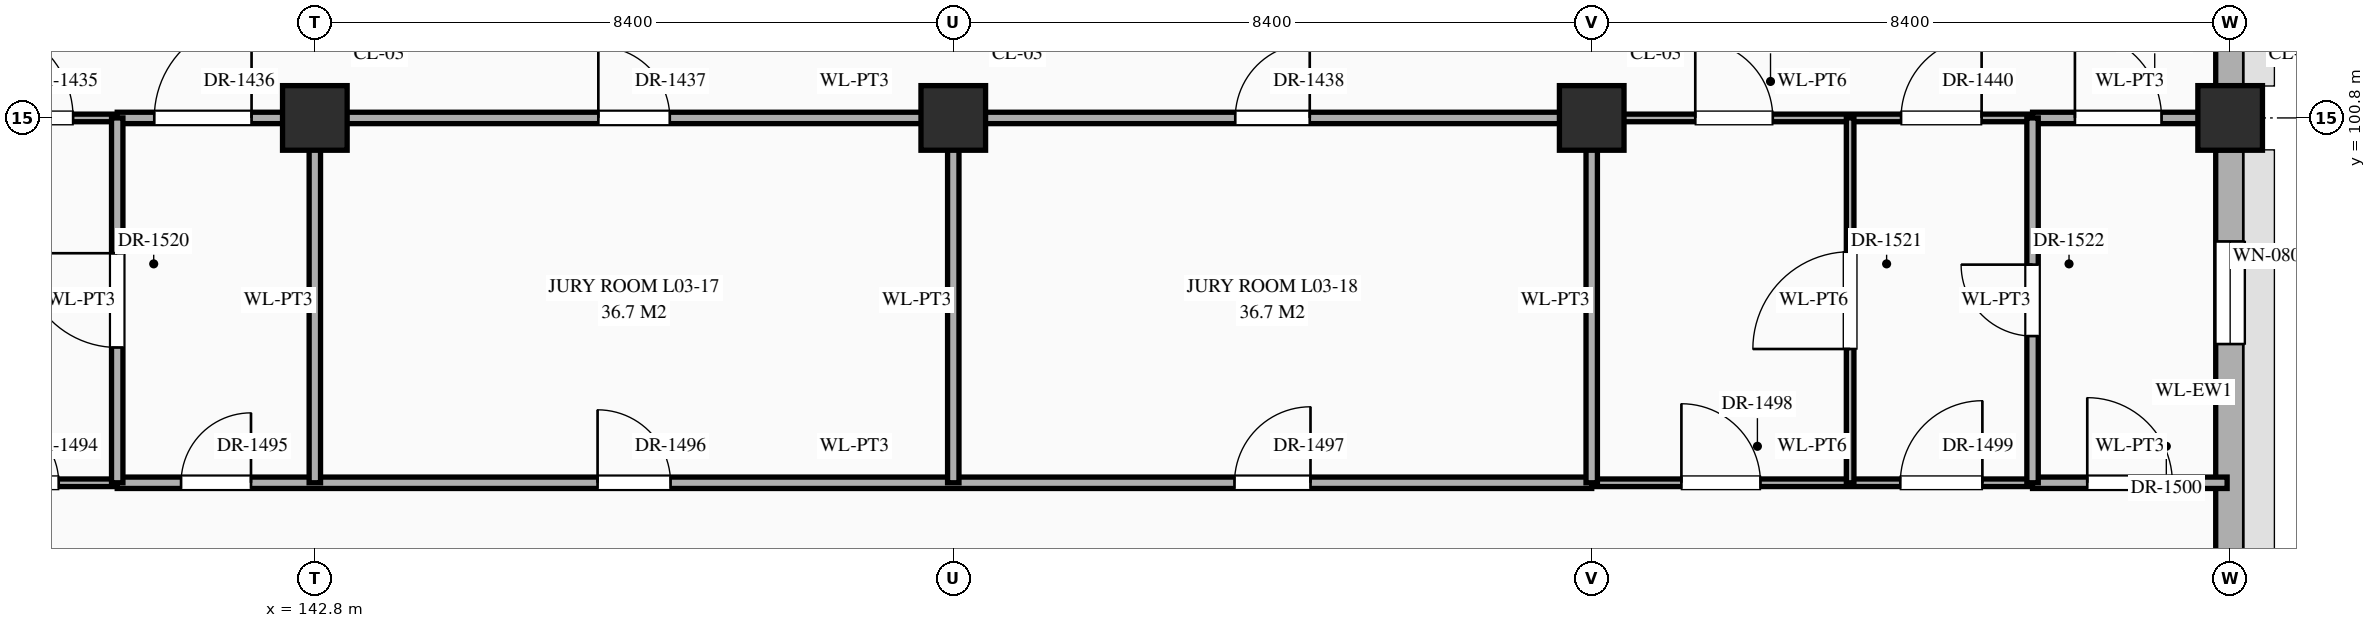
"""IFC4 building model, lengths in metres.
Left out: names, types, materials, properties, quantities, classifications, styles, units other than length and angle.
Written with IfcOpenShell. Run it as: python <this file> out.ifc"""

import sys

from ifc_helpers import new_model, si_unit, direction, frame, frame_2d, origin, origin_2d, place, context, subcontext, project, spatial, rectangle, extrude, element, fill, save


model = new_model("IFC4")
c1 = context("Model", 3, precision=1e-05, world=origin(), true_north=direction((0.0, 1.0)))
c2 = subcontext(c1, "Body", "Model", "MODEL_VIEW")
j1 = project(units=[si_unit("LENGTHUNIT", "METRE"), si_unit("PLANEANGLEUNIT", "RADIAN")], contexts=[c1])
p1 = place(None, origin())
s1 = spatial("IfcSite", under=j1, at=p1, CompositionType="ELEMENT")
p2 = place(p1, origin())
s2 = spatial("IfcBuilding", under=s1, at=p2, CompositionType="ELEMENT")
p3 = place(p2, frame((0.0, 0.0, 10.8)))
s3 = spatial("IfcBuildingStorey", under=s2, at=p3, CompositionType="ELEMENT", Elevation=10.8)
for number, where, z_axis, x_axis in (
    (1, (142.8, 100.8, 0.0), (0.0, 0.0, 1.0), (1.0, 0.0, 0.0)),
    (2, (151.2, 100.8, 0.0), (0.0, 0.0, 1.0), (1.0, 0.0, 0.0)),
    (3, (159.6, 100.8, 0.0), (0.0, 0.0, 1.0), (1.0, 0.0, 0.0)),
    (4, (168.0, 100.8, 0.0), (0.0, 0.0, 1.0), (1.0, 0.0, 0.0)),
):
    element("IfcColumn", number, at=place(p3, frame(where, z_axis=z_axis, x_axis=x_axis)), inside=s3, PredefinedType="COLUMN", context=c2, shape_type="SweptSolid", body=[
        extrude(rectangle(XDim=0.85, YDim=0.85, at=origin_2d()), origin(), (0.0, 0.0, 1.0), 5.4),
    ])
p4 = place(p3, frame((168.0, 94.02, 0.0), z_axis=(0.0, 0.0, 1.0), x_axis=(0.0, 1.0, 0.0)))
e5 = element("IfcWall", 5, at=p4, inside=s3, PredefinedType="STANDARD", context=c2, shape_type="SweptSolid", body=[
    extrude(rectangle(XDim=6.36, YDim=0.38, at=frame_2d((3.18, 0.0))), origin(), (0.0, 0.0, 1.0), 4.47),
])
p5 = place(p4, frame((3.805, 0.0, 0.85)))
e6 = element("IfcOpeningElement", 6, at=p5, cuts=e5, PredefinedType="OPENING", context=c2, shape_type="SweptSolid", body=[
    extrude(rectangle(XDim=1.35, YDim=1.2, at=frame_2d((0.675, 0.6))), frame((0.0, 0.202, 0.0), z_axis=(0.0, -1.0, 0.0), x_axis=(1.0, 0.0, 0.0)), (0.0, 0.0, 1.0), 0.404),
])
p6 = place(p3, frame((168.0, 101.22, 0.0), z_axis=(0.0, 0.0, 1.0), x_axis=(0.0, 1.0, 0.0)))
e7 = element("IfcWall", 7, at=p6, inside=s3, PredefinedType="STANDARD", context=c2, shape_type="SweptSolid", body=[
    extrude(rectangle(XDim=6.36, YDim=0.38, at=frame_2d((3.18, 0.0))), origin(), (0.0, 0.0, 1.0), 4.47),
])
p7 = place(p6, frame((3.805, 0.0, 0.85)))
e8 = element("IfcOpeningElement", 8, at=p7, cuts=e7, PredefinedType="OPENING", context=c2, shape_type="SweptSolid", body=[
    extrude(rectangle(XDim=1.35, YDim=1.38, at=frame_2d((0.675, 0.69))), frame((0.0, 0.202, 0.0), z_axis=(0.0, -1.0, 0.0), x_axis=(1.0, 0.0, 0.0)), (0.0, 0.0, 1.0), 0.404),
])
p8 = place(p3, frame((134.4, 96.0, 0.0), z_axis=(0.0, 0.0, 1.0), x_axis=(1.0, 0.0, 0.0)))
e9 = element("IfcWall", 9, at=p8, inside=s3, PredefinedType="STANDARD", context=c2, shape_type="SweptSolid", body=[
    extrude(rectangle(XDim=5.8, YDim=0.1, at=frame_2d((2.9, 0.0))), origin(), (0.0, 0.0, 1.0), 5.12),
])
p9 = place(p8, frame((1.25, 0.0, 0.0)))
e10 = element("IfcOpeningElement", 10, at=p9, cuts=e9, PredefinedType="OPENING", context=c2, shape_type="SweptSolid", body=[
    extrude(rectangle(XDim=0.9, YDim=2.15, at=frame_2d((0.45, 1.075))), frame((0.0, 0.062, 0.0), z_axis=(0.0, -1.0, 0.0), x_axis=(1.0, 0.0, 0.0)), (0.0, 0.0, 1.0), 0.124),
])
p10 = place(p8, frame((4.17, 0.0, 0.0)))
e11 = element("IfcOpeningElement", 11, at=p10, cuts=e9, PredefinedType="OPENING", context=c2, shape_type="SweptSolid", body=[
    extrude(rectangle(XDim=0.86, YDim=2.1, at=frame_2d((0.43, 1.05))), frame((0.0, 0.062, 0.0), z_axis=(0.0, -1.0, 0.0), x_axis=(1.0, 0.0, 0.0)), (0.0, 0.0, 1.0), 0.124),
])
p11 = place(p3, frame((140.2, 96.0, 0.0), z_axis=(0.0, 0.0, 1.0), x_axis=(1.0, 0.0, 0.0)))
e12 = element("IfcWall", 12, at=p11, inside=s3, PredefinedType="STANDARD", context=c2, shape_type="SweptSolid", body=[
    extrude(rectangle(XDim=19.4, YDim=0.15, at=frame_2d((9.7, 0.0))), origin(), (0.0, 0.0, 1.0), 5.12),
])
p12 = place(p11, frame((0.84, 0.0, 0.0)))
e13 = element("IfcOpeningElement", 13, at=p12, cuts=e12, PredefinedType="OPENING", context=c2, shape_type="SweptSolid", body=[
    extrude(rectangle(XDim=0.92, YDim=2.15, at=frame_2d((0.46, 1.075))), frame((0.0, 0.087, 0.0), z_axis=(0.0, -1.0, 0.0), x_axis=(1.0, 0.0, 0.0)), (0.0, 0.0, 1.0), 0.174),
])
p13 = place(p11, frame((6.32, 0.0, 0.0)))
e14 = element("IfcOpeningElement", 14, at=p13, cuts=e12, PredefinedType="OPENING", context=c2, shape_type="SweptSolid", body=[
    extrude(rectangle(XDim=0.96, YDim=2.2, at=frame_2d((0.48, 1.1))), frame((0.0, 0.087, 0.0), z_axis=(0.0, -1.0, 0.0), x_axis=(1.0, 0.0, 0.0)), (0.0, 0.0, 1.0), 0.174),
])
p14 = place(p11, frame((14.7, 0.0, 0.0)))
e15 = element("IfcOpeningElement", 15, at=p14, cuts=e12, PredefinedType="OPENING", context=c2, shape_type="SweptSolid", body=[
    extrude(rectangle(XDim=1.0, YDim=2.25, at=frame_2d((0.5, 1.125))), frame((0.0, 0.087, 0.0), z_axis=(0.0, -1.0, 0.0), x_axis=(1.0, 0.0, 0.0)), (0.0, 0.0, 1.0), 0.174),
])
p15 = place(p3, frame((159.6, 96.0, 0.0), z_axis=(0.0, 0.0, 1.0), x_axis=(1.0, 0.0, 0.0)))
e16 = element("IfcWall", 16, at=p15, inside=s3, PredefinedType="STANDARD", context=c2, shape_type="SweptSolid", body=[
    extrude(rectangle(XDim=5.8, YDim=0.1, at=frame_2d((2.9, 0.0))), origin(), (0.0, 0.0, 1.0), 5.12),
])
p16 = place(p15, frame((1.18, 0.0, 0.0)))
e17 = element("IfcOpeningElement", 17, at=p16, cuts=e16, PredefinedType="OPENING", context=c2, shape_type="SweptSolid", body=[
    extrude(rectangle(XDim=1.04, YDim=2.2, at=frame_2d((0.52, 1.1))), frame((0.0, 0.062, 0.0), z_axis=(0.0, -1.0, 0.0), x_axis=(1.0, 0.0, 0.0)), (0.0, 0.0, 1.0), 0.124),
])
p17 = place(p15, frame((4.06, 0.0, 0.0)))
e18 = element("IfcOpeningElement", 18, at=p17, cuts=e16, PredefinedType="OPENING", context=c2, shape_type="SweptSolid", body=[
    extrude(rectangle(XDim=1.08, YDim=2.25, at=frame_2d((0.54, 1.125))), frame((0.0, 0.062, 0.0), z_axis=(0.0, -1.0, 0.0), x_axis=(1.0, 0.0, 0.0)), (0.0, 0.0, 1.0), 0.124),
])
p18 = place(p3, frame((165.4, 96.0, 0.0), z_axis=(0.0, 0.0, 1.0), x_axis=(1.0, 0.0, 0.0)))
e19 = element("IfcWall", 19, at=p18, inside=s3, PredefinedType="STANDARD", context=c2, shape_type="SweptSolid", body=[
    extrude(rectangle(XDim=2.56, YDim=0.15, at=frame_2d((1.28, 0.0))), origin(), (0.0, 0.0, 1.0), 5.12),
])
p19 = place(p18, frame((0.72, 0.0, 0.0)))
e20 = element("IfcOpeningElement", 20, at=p19, cuts=e19, PredefinedType="OPENING", context=c2, shape_type="SweptSolid", body=[
    extrude(rectangle(XDim=1.12, YDim=2.25, at=frame_2d((0.56, 1.125))), frame((0.0, 0.087, 0.0), z_axis=(0.0, -1.0, 0.0), x_axis=(1.0, 0.0, 0.0)), (0.0, 0.0, 1.0), 0.174),
])
p20 = place(p3, frame((134.4, 100.8, 0.0), z_axis=(0.0, 0.0, 1.0), x_axis=(1.0, 0.0, 0.0)))
e21 = element("IfcWall", 21, at=p20, inside=s3, PredefinedType="STANDARD", context=c2, shape_type="SweptSolid", body=[
    extrude(rectangle(XDim=5.8, YDim=0.1, at=frame_2d((2.9, 0.0))), origin(), (0.0, 0.0, 1.0), 4.27),
])
p21 = place(p20, frame((1.272, 0.0, 0.0)))
e22 = element("IfcOpeningElement", 22, at=p21, cuts=e21, PredefinedType="OPENING", context=c2, shape_type="SweptSolid", body=[
    extrude(rectangle(XDim=1.2, YDim=2.35, at=frame_2d((0.6, 1.175))), frame((0.0, 0.062, 0.0), z_axis=(0.0, -1.0, 0.0), x_axis=(1.0, 0.0, 0.0)), (0.0, 0.0, 1.0), 0.124),
])
p22 = place(p20, frame((3.98, 0.0, 0.0)))
e23 = element("IfcOpeningElement", 23, at=p22, cuts=e21, PredefinedType="OPENING", context=c2, shape_type="SweptSolid", body=[
    extrude(rectangle(XDim=1.24, YDim=2.3, at=frame_2d((0.62, 1.15))), frame((0.0, 0.062, 0.0), z_axis=(0.0, -1.0, 0.0), x_axis=(1.0, 0.0, 0.0)), (0.0, 0.0, 1.0), 0.124),
])
p23 = place(p3, frame((140.2, 100.8, 0.0), z_axis=(0.0, 0.0, 1.0), x_axis=(1.0, 0.0, 0.0)))
e24 = element("IfcWall", 24, at=p23, inside=s3, PredefinedType="STANDARD", context=c2, shape_type="SweptSolid", body=[
    extrude(rectangle(XDim=19.4, YDim=0.15, at=frame_2d((9.7, 0.0))), origin(), (0.0, 0.0, 1.0), 4.27),
])
p24 = place(p23, frame((0.488, 0.0, 0.0)))
e25 = element("IfcOpeningElement", 25, at=p24, cuts=e24, PredefinedType="OPENING", context=c2, shape_type="SweptSolid", body=[
    extrude(rectangle(XDim=1.28, YDim=2.35, at=frame_2d((0.64, 1.175))), frame((0.0, 0.087, 0.0), z_axis=(0.0, -1.0, 0.0), x_axis=(1.0, 0.0, 0.0)), (0.0, 0.0, 1.0), 0.174),
])
p25 = place(p23, frame((6.33, 0.0, 0.0)))
e26 = element("IfcOpeningElement", 26, at=p25, cuts=e24, PredefinedType="OPENING", context=c2, shape_type="SweptSolid", body=[
    extrude(rectangle(XDim=0.94, YDim=2.3, at=frame_2d((0.47, 1.15))), frame((0.0, 0.087, 0.0), z_axis=(0.0, -1.0, 0.0), x_axis=(1.0, 0.0, 0.0)), (0.0, 0.0, 1.0), 0.174),
])
p26 = place(p23, frame((14.71, 0.0, 0.0)))
e27 = element("IfcOpeningElement", 27, at=p26, cuts=e24, PredefinedType="OPENING", context=c2, shape_type="SweptSolid", body=[
    extrude(rectangle(XDim=0.98, YDim=2.35, at=frame_2d((0.49, 1.175))), frame((0.0, 0.087, 0.0), z_axis=(0.0, -1.0, 0.0), x_axis=(1.0, 0.0, 0.0)), (0.0, 0.0, 1.0), 0.174),
])
p27 = place(p3, frame((159.6, 100.8, 0.0), z_axis=(0.0, 0.0, 1.0), x_axis=(1.0, 0.0, 0.0)))
e28 = element("IfcWall", 28, at=p27, inside=s3, PredefinedType="STANDARD", context=c2, shape_type="SweptSolid", body=[
    extrude(rectangle(XDim=5.8, YDim=0.1, at=frame_2d((2.9, 0.0))), origin(), (0.0, 0.0, 1.0), 4.27),
])
p28 = place(p27, frame((1.363, 0.0, 0.0)))
e29 = element("IfcOpeningElement", 29, at=p28, cuts=e28, PredefinedType="OPENING", context=c2, shape_type="SweptSolid", body=[
    extrude(rectangle(XDim=1.02, YDim=2.4, at=frame_2d((0.51, 1.2))), frame((0.0, 0.062, 0.0), z_axis=(0.0, -1.0, 0.0), x_axis=(1.0, 0.0, 0.0)), (0.0, 0.0, 1.0), 0.124),
])
p29 = place(p27, frame((4.07, 0.0, 0.0)))
e30 = element("IfcOpeningElement", 30, at=p29, cuts=e28, PredefinedType="OPENING", context=c2, shape_type="SweptSolid", body=[
    extrude(rectangle(XDim=1.06, YDim=2.4, at=frame_2d((0.53, 1.2))), frame((0.0, 0.062, 0.0), z_axis=(0.0, -1.0, 0.0), x_axis=(1.0, 0.0, 0.0)), (0.0, 0.0, 1.0), 0.124),
])
p30 = place(p3, frame((165.4, 100.8, 0.0), z_axis=(0.0, 0.0, 1.0), x_axis=(1.0, 0.0, 0.0)))
e31 = element("IfcWall", 31, at=p30, inside=s3, PredefinedType="STANDARD", context=c2, shape_type="SweptSolid", body=[
    extrude(rectangle(XDim=2.56, YDim=0.15, at=frame_2d((1.28, 0.0))), origin(), (0.0, 0.0, 1.0), 4.27),
])
p31 = place(p30, frame((0.558, 0.0, 0.0)))
e32 = element("IfcOpeningElement", 32, at=p31, cuts=e31, PredefinedType="OPENING", context=c2, shape_type="SweptSolid", body=[
    extrude(rectangle(XDim=1.14, YDim=2.4, at=frame_2d((0.57, 1.2))), frame((0.0, 0.087, 0.0), z_axis=(0.0, -1.0, 0.0), x_axis=(1.0, 0.0, 0.0)), (0.0, 0.0, 1.0), 0.174),
])
p32 = place(p3, frame((140.2, 96.0, 0.0), z_axis=(0.0, 0.0, 1.0), x_axis=(0.0, 1.0, 0.0)))
e33 = element("IfcWall", 33, at=p32, inside=s3, PredefinedType="STANDARD", context=c2, shape_type="SweptSolid", body=[
    extrude(rectangle(XDim=4.8, YDim=0.15, at=frame_2d((2.4, 0.0))), origin(), (0.0, 0.0, 1.0), 5.12),
])
p33 = place(p32, frame((1.78, 0.0, 0.0)))
e34 = element("IfcOpeningElement", 34, at=p33, cuts=e33, PredefinedType="OPENING", context=c2, shape_type="SweptSolid", body=[
    extrude(rectangle(XDim=1.24, YDim=2.3, at=frame_2d((0.62, 1.15))), frame((0.0, 0.087, 0.0), z_axis=(0.0, -1.0, 0.0), x_axis=(1.0, 0.0, 0.0)), (0.0, 0.0, 1.0), 0.174),
])
for number, where, z_axis, x_axis in (
    (35, (142.8, 96.0, 0.0), (0.0, 0.0, 1.0), (0.0, 1.0, 0.0)),
    (36, (151.2, 96.0, 0.0), (0.0, 0.0, 1.0), (0.0, 1.0, 0.0)),
    (37, (159.6, 96.0, 0.0), (0.0, 0.0, 1.0), (0.0, 1.0, 0.0)),
):
    element("IfcWall", number, at=place(p3, frame(where, z_axis=z_axis, x_axis=x_axis)), inside=s3, PredefinedType="STANDARD", context=c2, shape_type="SweptSolid", body=[
        extrude(rectangle(XDim=4.8, YDim=0.15, at=frame_2d((2.4, 0.0))), origin(), (0.0, 0.0, 1.0), 4.37),
    ])
p34 = place(p3, frame((163.0, 96.0, 0.0), z_axis=(0.0, 0.0, 1.0), x_axis=(0.0, 1.0, 0.0)))
e38 = element("IfcWall", 38, at=p34, inside=s3, PredefinedType="STANDARD", context=c2, shape_type="SweptSolid", body=[
    extrude(rectangle(XDim=4.8, YDim=0.1, at=frame_2d((2.4, 0.0))), origin(), (0.0, 0.0, 1.0), 5.12),
])
p35 = place(p34, frame((1.76, 0.0, 0.0)))
e39 = element("IfcOpeningElement", 39, at=p35, cuts=e38, PredefinedType="OPENING", context=c2, shape_type="SweptSolid", body=[
    extrude(rectangle(XDim=1.28, YDim=2.35, at=frame_2d((0.64, 1.175))), frame((0.0, 0.062, 0.0), z_axis=(0.0, -1.0, 0.0), x_axis=(1.0, 0.0, 0.0)), (0.0, 0.0, 1.0), 0.124),
])
p36 = place(p3, frame((165.4, 96.0, 0.0), z_axis=(0.0, 0.0, 1.0), x_axis=(0.0, 1.0, 0.0)))
e40 = element("IfcWall", 40, at=p36, inside=s3, PredefinedType="STANDARD", context=c2, shape_type="SweptSolid", body=[
    extrude(rectangle(XDim=4.8, YDim=0.15, at=frame_2d((2.4, 0.0))), origin(), (0.0, 0.0, 1.0), 5.12),
])
p37 = place(p36, frame((1.93, 0.0, 0.0)))
e41 = element("IfcOpeningElement", 41, at=p37, cuts=e40, PredefinedType="OPENING", context=c2, shape_type="SweptSolid", body=[
    extrude(rectangle(XDim=0.94, YDim=2.3, at=frame_2d((0.47, 1.15))), frame((0.0, 0.087, 0.0), z_axis=(0.0, -1.0, 0.0), x_axis=(1.0, 0.0, 0.0)), (0.0, 0.0, 1.0), 0.174),
])
p38 = place(p5, origin())
e42 = element("IfcWindow", 42, at=p38, inside=s3, PartitioningType="SINGLE_PANEL", PredefinedType="WINDOW", context=c2, shape_type="SweptSolid", body=[
    extrude(rectangle(XDim=1.35, YDim=1.2, at=frame_2d((0.675, 0.6))), frame((0.0, 0.03, 0.0), z_axis=(0.0, -1.0, 0.0), x_axis=(1.0, 0.0, 0.0)), (0.0, 0.0, 1.0), 0.06),
])
fill(e6, e42)
p39 = place(p22, origin())
e43 = element("IfcDoor", 43, at=p39, inside=s3, OperationType="SINGLE_SWING_LEFT", PredefinedType="DOOR", context=c2, shape_type="SweptSolid", body=[
    extrude(rectangle(XDim=1.24, YDim=2.3, at=frame_2d((0.62, 1.15))), frame((0.0, 0.025, 0.0), z_axis=(0.0, -1.0, 0.0), x_axis=(1.0, 0.0, 0.0)), (0.0, 0.0, 1.0), 0.05),
])
fill(e23, e43)
p40 = place(p24, origin())
e44 = element("IfcDoor", 44, at=p40, inside=s3, OperationType="SINGLE_SWING_RIGHT", PredefinedType="DOOR", context=c2, shape_type="SweptSolid", body=[
    extrude(rectangle(XDim=1.28, YDim=2.35, at=frame_2d((0.64, 1.175))), frame((0.0, 0.025, 0.0), z_axis=(0.0, -1.0, 0.0), x_axis=(1.0, 0.0, 0.0)), (0.0, 0.0, 1.0), 0.05),
])
fill(e25, e44)
p41 = place(p25, origin())
e45 = element("IfcDoor", 45, at=p41, inside=s3, OperationType="SINGLE_SWING_LEFT", PredefinedType="DOOR", context=c2, shape_type="SweptSolid", body=[
    extrude(rectangle(XDim=0.94, YDim=2.3, at=frame_2d((0.47, 1.15))), frame((0.0, 0.025, 0.0), z_axis=(0.0, -1.0, 0.0), x_axis=(1.0, 0.0, 0.0)), (0.0, 0.0, 1.0), 0.05),
])
fill(e26, e45)
p42 = place(p26, origin())
e46 = element("IfcDoor", 46, at=p42, inside=s3, OperationType="SINGLE_SWING_RIGHT", PredefinedType="DOOR", context=c2, shape_type="SweptSolid", body=[
    extrude(rectangle(XDim=0.98, YDim=2.35, at=frame_2d((0.49, 1.175))), frame((0.0, 0.025, 0.0), z_axis=(0.0, -1.0, 0.0), x_axis=(1.0, 0.0, 0.0)), (0.0, 0.0, 1.0), 0.05),
])
fill(e27, e46)
p43 = place(p28, origin())
e47 = element("IfcDoor", 47, at=p43, inside=s3, OperationType="SINGLE_SWING_LEFT", PredefinedType="DOOR", context=c2, shape_type="SweptSolid", body=[
    extrude(rectangle(XDim=1.02, YDim=2.4, at=frame_2d((0.51, 1.2))), frame((0.0, 0.025, 0.0), z_axis=(0.0, -1.0, 0.0), x_axis=(1.0, 0.0, 0.0)), (0.0, 0.0, 1.0), 0.05),
])
fill(e29, e47)
p44 = place(p29, origin())
e48 = element("IfcDoor", 48, at=p44, inside=s3, OperationType="SINGLE_SWING_RIGHT", PredefinedType="DOOR", context=c2, shape_type="SweptSolid", body=[
    extrude(rectangle(XDim=1.06, YDim=2.4, at=frame_2d((0.53, 1.2))), frame((0.0, 0.025, 0.0), z_axis=(0.0, -1.0, 0.0), x_axis=(1.0, 0.0, 0.0)), (0.0, 0.0, 1.0), 0.05),
])
fill(e30, e48)
p45 = place(p31, origin())
e49 = element("IfcDoor", 49, at=p45, inside=s3, OperationType="SINGLE_SWING_LEFT", PredefinedType="DOOR", context=c2, shape_type="SweptSolid", body=[
    extrude(rectangle(XDim=1.14, YDim=2.4, at=frame_2d((0.57, 1.2))), frame((0.0, 0.025, 0.0), z_axis=(0.0, -1.0, 0.0), x_axis=(1.0, 0.0, 0.0)), (0.0, 0.0, 1.0), 0.05),
])
fill(e32, e49)
p46 = place(p10, origin())
e50 = element("IfcDoor", 50, at=p46, inside=s3, OperationType="SINGLE_SWING_LEFT", PredefinedType="DOOR", context=c2, shape_type="SweptSolid", body=[
    extrude(rectangle(XDim=0.86, YDim=2.1, at=frame_2d((0.43, 1.05))), frame((0.0, 0.025, 0.0), z_axis=(0.0, -1.0, 0.0), x_axis=(1.0, 0.0, 0.0)), (0.0, 0.0, 1.0), 0.05),
])
fill(e11, e50)
p47 = place(p12, origin())
e51 = element("IfcDoor", 51, at=p47, inside=s3, OperationType="SINGLE_SWING_RIGHT", PredefinedType="DOOR", context=c2, shape_type="SweptSolid", body=[
    extrude(rectangle(XDim=0.92, YDim=2.15, at=frame_2d((0.46, 1.075))), frame((0.0, 0.025, 0.0), z_axis=(0.0, -1.0, 0.0), x_axis=(1.0, 0.0, 0.0)), (0.0, 0.0, 1.0), 0.05),
])
fill(e13, e51)
p48 = place(p13, origin())
e52 = element("IfcDoor", 52, at=p48, inside=s3, OperationType="SINGLE_SWING_LEFT", PredefinedType="DOOR", context=c2, shape_type="SweptSolid", body=[
    extrude(rectangle(XDim=0.96, YDim=2.2, at=frame_2d((0.48, 1.1))), frame((0.0, 0.025, 0.0), z_axis=(0.0, -1.0, 0.0), x_axis=(1.0, 0.0, 0.0)), (0.0, 0.0, 1.0), 0.05),
])
fill(e14, e52)
p49 = place(p14, origin())
e53 = element("IfcDoor", 53, at=p49, inside=s3, OperationType="SINGLE_SWING_RIGHT", PredefinedType="DOOR", context=c2, shape_type="SweptSolid", body=[
    extrude(rectangle(XDim=1.0, YDim=2.25, at=frame_2d((0.5, 1.125))), frame((0.0, 0.025, 0.0), z_axis=(0.0, -1.0, 0.0), x_axis=(1.0, 0.0, 0.0)), (0.0, 0.0, 1.0), 0.05),
])
fill(e15, e53)
p50 = place(p16, origin())
e54 = element("IfcDoor", 54, at=p50, inside=s3, OperationType="SINGLE_SWING_LEFT", PredefinedType="DOOR", context=c2, shape_type="SweptSolid", body=[
    extrude(rectangle(XDim=1.04, YDim=2.2, at=frame_2d((0.52, 1.1))), frame((0.0, 0.025, 0.0), z_axis=(0.0, -1.0, 0.0), x_axis=(1.0, 0.0, 0.0)), (0.0, 0.0, 1.0), 0.05),
])
fill(e17, e54)
p51 = place(p17, origin())
e55 = element("IfcDoor", 55, at=p51, inside=s3, OperationType="SINGLE_SWING_RIGHT", PredefinedType="DOOR", context=c2, shape_type="SweptSolid", body=[
    extrude(rectangle(XDim=1.08, YDim=2.25, at=frame_2d((0.54, 1.125))), frame((0.0, 0.025, 0.0), z_axis=(0.0, -1.0, 0.0), x_axis=(1.0, 0.0, 0.0)), (0.0, 0.0, 1.0), 0.05),
])
fill(e18, e55)
p52 = place(p19, origin())
e56 = element("IfcDoor", 56, at=p52, inside=s3, OperationType="SINGLE_SWING_LEFT", PredefinedType="DOOR", context=c2, shape_type="SweptSolid", body=[
    extrude(rectangle(XDim=1.12, YDim=2.25, at=frame_2d((0.56, 1.125))), frame((0.0, 0.025, 0.0), z_axis=(0.0, -1.0, 0.0), x_axis=(1.0, 0.0, 0.0)), (0.0, 0.0, 1.0), 0.05),
])
fill(e20, e56)
p53 = place(p33, origin())
e57 = element("IfcDoor", 57, at=p53, inside=s3, OperationType="SINGLE_SWING_RIGHT", PredefinedType="DOOR", context=c2, shape_type="SweptSolid", body=[
    extrude(rectangle(XDim=1.24, YDim=2.3, at=frame_2d((0.62, 1.15))), frame((0.0, 0.025, 0.0), z_axis=(0.0, -1.0, 0.0), x_axis=(1.0, 0.0, 0.0)), (0.0, 0.0, 1.0), 0.05),
])
fill(e34, e57)
p54 = place(p35, origin())
e58 = element("IfcDoor", 58, at=p54, inside=s3, OperationType="SINGLE_SWING_LEFT", PredefinedType="DOOR", context=c2, shape_type="SweptSolid", body=[
    extrude(rectangle(XDim=1.28, YDim=2.35, at=frame_2d((0.64, 1.175))), frame((0.0, 0.025, 0.0), z_axis=(0.0, -1.0, 0.0), x_axis=(1.0, 0.0, 0.0)), (0.0, 0.0, 1.0), 0.05),
])
fill(e39, e58)
p55 = place(p37, origin())
e59 = element("IfcDoor", 59, at=p55, inside=s3, OperationType="SINGLE_SWING_RIGHT", PredefinedType="DOOR", context=c2, shape_type="SweptSolid", body=[
    extrude(rectangle(XDim=0.94, YDim=2.3, at=frame_2d((0.47, 1.15))), frame((0.0, 0.025, 0.0), z_axis=(0.0, -1.0, 0.0), x_axis=(1.0, 0.0, 0.0)), (0.0, 0.0, 1.0), 0.05),
])
fill(e41, e59)
save(model, sys.argv[1])
